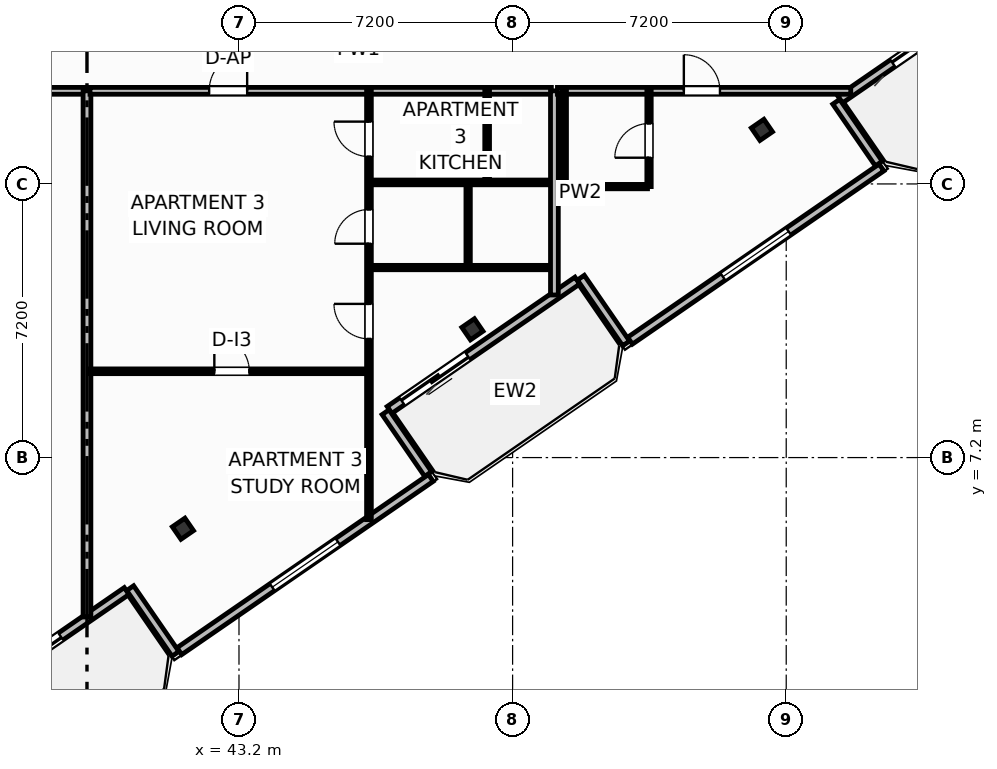
"""IFC4 building model, lengths in metres.
Left out: names, types, materials, properties, quantities, classifications, styles, units other than length and angle.
Written with IfcOpenShell. Run it as: python <this file> out.ifc"""

import sys

from ifc_helpers import new_model, si_unit, direction, frame, frame_2d, origin, origin_2d, place, context, subcontext, project, spatial, rectangle, i_section, extrude, element, fill, save


model = new_model("IFC4")
c1 = context("Model", 3, precision=1e-05, world=origin(), true_north=direction((0.0, 1.0)))
c2 = subcontext(c1, "Body", "Model", "MODEL_VIEW")
j1 = project(units=[si_unit("LENGTHUNIT", "METRE"), si_unit("PLANEANGLEUNIT", "RADIAN")], contexts=[c1])
p1 = place(None, origin())
s1 = spatial("IfcSite", under=j1, at=p1, CompositionType="ELEMENT")
p2 = place(p1, origin())
s2 = spatial("IfcBuilding", under=s1, at=p2, CompositionType="ELEMENT")
p3 = place(p2, frame((0.0, 0.0, 269.3)))
s3 = spatial("IfcBuildingStorey", under=s2, at=p3, CompositionType="ELEMENT", Elevation=269.3)
for number, where, z_axis, x_axis in (
    (1, (41.725, 5.328, 0.0), (0.0, 0.0, 1.0), (0.824, 0.567, 0.0)),
    (2, (49.343, 10.575, 0.0), (0.0, 0.0, 1.0), (0.824, 0.567, 0.0)),
    (3, (56.96, 15.823, 0.0), (0.0, 0.0, 1.0), (0.824, 0.567, 0.0)),
):
    element("IfcColumn", number, at=place(p3, frame(where, z_axis=z_axis, x_axis=x_axis)), inside=s3, PredefinedType="COLUMN", context=c2, shape_type="SweptSolid", body=[
        extrude(i_section(OverallWidth=0.401, OverallDepth=0.399, WebThickness=0.025, FlangeThickness=0.04, FilletRadius=0.022, at=origin_2d()), origin(), (0.0, 0.0, 1.0), 3.7),
    ])
p4 = place(p3, frame((40.244, 3.688, 0.0), z_axis=(0.0, 0.0, 1.0), x_axis=(-0.823541290762, -0.567256328665, 0.0)))
e4 = element("IfcWall", 4, at=p4, inside=s3, PredefinedType="SOLIDWALL", context=c2, shape_type="SweptSolid", body=[
    extrude(rectangle(XDim=5.567, YDim=0.22, at=frame_2d((2.784, 0.0))), origin(), (0.0, 0.0, 1.0), 2.73),
])
p5 = place(p4, frame((2.107, 0.0, 0.0)))
e5 = element("IfcOpeningElement", 5, at=p5, cuts=e4, PredefinedType="OPENING", context=c2, shape_type="SweptSolid", body=[
    extrude(rectangle(XDim=2.1, YDim=2.3, at=frame_2d((1.05, 1.15))), frame((0.0, 0.12, 0.0), z_axis=(0.0, -1.0, 0.0), x_axis=(1.0, 0.0, 0.0)), (0.0, 0.0, 1.0), 0.24),
])
p6 = place(p3, frame((52.103, 11.857, 0.0), z_axis=(0.0, 0.0, 1.0), x_axis=(-0.823534636215, -0.567265989598, 0.0)))
e6 = element("IfcWall", 6, at=p6, inside=s3, PredefinedType="SOLIDWALL", context=c2, shape_type="SweptSolid", body=[
    extrude(rectangle(XDim=6.0, YDim=0.22, at=frame_2d((3.0, 0.0))), origin(), (0.0, 0.0, 1.0), 2.73),
])
p7 = place(p6, frame((3.5, 0.0, 0.0)))
e7 = element("IfcOpeningElement", 7, at=p7, cuts=e6, PredefinedType="OPENING", context=c2, shape_type="SweptSolid", body=[
    extrude(rectangle(XDim=2.1, YDim=2.3, at=frame_2d((1.05, 1.15))), frame((0.0, 0.12, 0.0), z_axis=(0.0, -1.0, 0.0), x_axis=(1.0, 0.0, 0.0)), (0.0, 0.0, 1.0), 0.24),
])
p8 = place(p3, frame((63.605, 19.78, 0.0), z_axis=(0.0, 0.0, 1.0), x_axis=(-0.823541290762, -0.567256328665, 0.0)))
e8 = element("IfcWall", 8, at=p8, inside=s3, PredefinedType="SOLIDWALL", context=c2, shape_type="SweptSolid", body=[
    extrude(rectangle(XDim=5.567, YDim=0.22, at=frame_2d((2.784, 0.0))), origin(), (0.0, 0.0, 1.0), 2.73),
])
p9 = place(p8, frame((1.787, 0.0, 0.0)))
e9 = element("IfcOpeningElement", 9, at=p9, cuts=e8, PredefinedType="OPENING", context=c2, shape_type="SweptSolid", body=[
    extrude(rectangle(XDim=2.1, YDim=2.3, at=frame_2d((1.05, 1.15))), frame((0.0, 0.12, 0.0), z_axis=(0.0, -1.0, 0.0), x_axis=(1.0, 0.0, 0.0)), (0.0, 0.0, 1.0), 0.24),
])
p10 = place(p3, frame((40.337, 3.765, 0.0), z_axis=(0.0, 0.0, 1.0), x_axis=(0.567352541689, -0.823475010816, 0.0)))
e10 = element("IfcWall", 10, at=p10, inside=s3, PredefinedType="SOLIDWALL", context=c2, shape_type="SweptSolid", body=[
    extrude(rectangle(XDim=2.1, YDim=0.22, at=frame_2d((1.05, 0.0))), origin(), (0.0, 0.0, 1.0), 2.73),
])
p11 = place(p3, frame((41.631, 2.106, 0.0), z_axis=(0.0, 0.0, 1.0), x_axis=(0.823530942962, 0.56727135128, 0.0)))
e11 = element("IfcWall", 11, at=p11, inside=s3, PredefinedType="SOLIDWALL", context=c2, shape_type="SweptSolid", body=[
    extrude(rectangle(XDim=8.035, YDim=0.22, at=frame_2d((4.018, 0.0))), origin(), (0.0, 0.0, 1.0), 2.73),
])
p12 = place(p11, frame((2.968, 0.0, 0.8)))
e12 = element("IfcOpeningElement", 12, at=p12, cuts=e11, PredefinedType="OPENING", context=c2, shape_type="SweptSolid", body=[
    extrude(rectangle(XDim=2.1, YDim=1.75, at=frame_2d((1.05, 0.875))), frame((0.0, 0.12, 0.0), z_axis=(0.0, -1.0, 0.0), x_axis=(1.0, 0.0, 0.0)), (0.0, 0.0, 1.0), 0.24),
])
p13 = place(p3, frame((48.177, 6.767, 0.0), z_axis=(0.0, 0.0, 1.0), x_axis=(-0.567273565974, 0.823529417415, 0.0)))
e13 = element("IfcWall", 13, at=p13, inside=s3, PredefinedType="SOLIDWALL", context=c2, shape_type="SweptSolid", body=[
    extrude(rectangle(XDim=1.975, YDim=0.22, at=frame_2d((0.988, 0.0))), origin(), (0.0, 0.0, 1.0), 2.73),
])
p14 = place(p3, frame((52.196, 11.933, 0.0), z_axis=(0.0, 0.0, 1.0), x_axis=(0.56729822855, -0.823512428494, 0.0)))
e14 = element("IfcWall", 14, at=p14, inside=s3, PredefinedType="SOLIDWALL", context=c2, shape_type="SweptSolid", body=[
    extrude(rectangle(XDim=2.1, YDim=0.22, at=frame_2d((1.05, 0.0))), origin(), (0.0, 0.0, 1.0), 2.73),
])
p15 = place(p3, frame((53.49, 10.275, 0.0), z_axis=(0.0, 0.0, 1.0), x_axis=(0.823530942962, 0.56727135128, 0.0)))
e15 = element("IfcWall", 15, at=p15, inside=s3, PredefinedType="SOLIDWALL", context=c2, shape_type="SweptSolid", body=[
    extrude(rectangle(XDim=8.035, YDim=0.22, at=frame_2d((4.018, 0.0))), origin(), (0.0, 0.0, 1.0), 2.73),
])
p16 = place(p15, frame((2.968, 0.0, 0.8)))
e16 = element("IfcOpeningElement", 16, at=p16, cuts=e15, PredefinedType="OPENING", context=c2, shape_type="SweptSolid", body=[
    extrude(rectangle(XDim=2.1, YDim=1.75, at=frame_2d((1.05, 0.875))), frame((0.0, 0.12, 0.0), z_axis=(0.0, -1.0, 0.0), x_axis=(1.0, 0.0, 0.0)), (0.0, 0.0, 1.0), 0.24),
])
p17 = place(p3, frame((60.036, 14.936, 0.0), z_axis=(0.0, 0.0, 1.0), x_axis=(-0.567273565974, 0.823529417415, 0.0)))
e17 = element("IfcWall", 17, at=p17, inside=s3, PredefinedType="SOLIDWALL", context=c2, shape_type="SweptSolid", body=[
    extrude(rectangle(XDim=1.975, YDim=0.22, at=frame_2d((0.988, 0.0))), origin(), (0.0, 0.0, 1.0), 2.73),
])
p18 = place(p3, frame((27.08, 16.85, 0.0), z_axis=(0.0, 0.0, 1.0), x_axis=(1.0, 0.0, 0.0)))
e18 = element("IfcWall", 18, at=p18, inside=s3, PredefinedType="PARTITIONING", context=c2, shape_type="SweptSolid", body=[
    extrude(rectangle(XDim=12.04, YDim=0.18, at=frame_2d((6.02, 0.0))), origin(), (0.0, 0.0, 1.0), 3.45),
])
p19 = place(p18, frame((3.328, 0.0, 0.0)))
e19 = element("IfcOpeningElement", 19, at=p19, cuts=e18, PredefinedType="OPENING", context=c2, shape_type="SweptSolid", body=[
    extrude(rectangle(XDim=0.95, YDim=2.15, at=frame_2d((0.475, 1.075))), frame((0.0, 0.1, 0.0), z_axis=(0.0, -1.0, 0.0), x_axis=(1.0, 0.0, 0.0)), (0.0, 0.0, 1.0), 0.2),
])
p20 = place(p3, frame((39.2, 3.006, 0.0), z_axis=(0.0, 0.0, 1.0), x_axis=(0.0, 1.0, 0.0)))
e20 = element("IfcWall", 20, at=p20, inside=s3, PredefinedType="PARTITIONING", context=c2, shape_type="SweptSolid", body=[
    extrude(rectangle(XDim=13.844, YDim=0.205, at=frame_2d((6.922, 0.0))), origin(), (0.0, 0.0, 1.0), 3.45),
])
p21 = place(p3, frame((39.28, 9.47, 0.0), z_axis=(0.0, 0.0, 1.0), x_axis=(1.0, 0.0, 0.0)))
e21 = element("IfcWall", 21, at=p21, inside=s3, PredefinedType="PARTITIONING", context=c2, shape_type="SweptSolid", body=[
    extrude(rectangle(XDim=7.27, YDim=0.125, at=frame_2d((3.635, 0.0))), origin(), (0.0, 0.0, 1.0), 3.45),
])
p22 = place(p21, frame((3.271, 0.0, 0.0)))
e22 = element("IfcOpeningElement", 22, at=p22, cuts=e21, PredefinedType="OPENING", context=c2, shape_type="SweptSolid", body=[
    extrude(rectangle(XDim=0.92, YDim=2.05, at=frame_2d((0.46, 1.025))), frame((0.0, 0.073, 0.0), z_axis=(0.0, -1.0, 0.0), x_axis=(1.0, 0.0, 0.0)), (0.0, 0.0, 1.0), 0.145),
])
p23 = place(p3, frame((39.28, 16.85, 0.0), z_axis=(0.0, 0.0, 1.0), x_axis=(1.0, 0.0, 0.0)))
e23 = element("IfcWall", 23, at=p23, inside=s3, PredefinedType="PARTITIONING", context=c2, shape_type="SweptSolid", body=[
    extrude(rectangle(XDim=12.14, YDim=0.18, at=frame_2d((6.07, 0.0))), origin(), (0.0, 0.0, 1.0), 3.45),
])
p24 = place(p23, frame((3.135, 0.0, 0.0)))
e24 = element("IfcOpeningElement", 24, at=p24, cuts=e23, PredefinedType="OPENING", context=c2, shape_type="SweptSolid", body=[
    extrude(rectangle(XDim=1.0, YDim=2.2, at=frame_2d((0.5, 1.1))), frame((0.0, 0.1, 0.0), z_axis=(0.0, -1.0, 0.0), x_axis=(1.0, 0.0, 0.0)), (0.0, 0.0, 1.0), 0.2),
])
p25 = place(p3, frame((46.62, 5.567, 0.0), z_axis=(0.0, 0.0, 1.0), x_axis=(0.0, 1.0, 0.0)))
e25 = element("IfcWall", 25, at=p25, inside=s3, PredefinedType="PARTITIONING", context=c2, shape_type="SweptSolid", body=[
    extrude(rectangle(XDim=11.283, YDim=0.125, at=frame_2d((5.642, 0.0))), origin(), (0.0, 0.0, 1.0), 3.45),
])
p26 = place(p25, frame((4.757, 0.0, 0.0)))
e26 = element("IfcOpeningElement", 26, at=p26, cuts=e25, PredefinedType="OPENING", context=c2, shape_type="SweptSolid", body=[
    extrude(rectangle(XDim=0.92, YDim=2.05, at=frame_2d((0.46, 1.025))), frame((0.0, 0.073, 0.0), z_axis=(0.0, -1.0, 0.0), x_axis=(1.0, 0.0, 0.0)), (0.0, 0.0, 1.0), 0.145),
])
p27 = place(p25, frame((7.26, 0.0, 0.0)))
e27 = element("IfcOpeningElement", 27, at=p27, cuts=e25, PredefinedType="OPENING", context=c2, shape_type="SweptSolid", body=[
    extrude(rectangle(XDim=0.9, YDim=2.05, at=frame_2d((0.45, 1.025))), frame((0.0, 0.073, 0.0), z_axis=(0.0, -1.0, 0.0), x_axis=(1.0, 0.0, 0.0)), (0.0, 0.0, 1.0), 0.145),
])
p28 = place(p25, frame((9.553, 0.0, 0.0)))
e28 = element("IfcOpeningElement", 28, at=p28, cuts=e25, PredefinedType="OPENING", context=c2, shape_type="SweptSolid", body=[
    extrude(rectangle(XDim=0.92, YDim=2.05, at=frame_2d((0.46, 1.025))), frame((0.0, 0.073, 0.0), z_axis=(0.0, -1.0, 0.0), x_axis=(1.0, 0.0, 0.0)), (0.0, 0.0, 1.0), 0.145),
])
p29 = place(p3, frame((46.69, 14.44, 0.0), z_axis=(0.0, 0.0, 1.0), x_axis=(1.0, 0.0, 0.0)))
e29 = element("IfcWall", 29, at=p29, inside=s3, PredefinedType="PARTITIONING", context=c2, shape_type="SweptSolid", body=[
    extrude(rectangle(XDim=4.73, YDim=0.125, at=frame_2d((2.365, 0.0))), origin(), (0.0, 0.0, 1.0), 3.45),
])
p30 = place(p3, frame((46.69, 12.2, 0.0), z_axis=(0.0, 0.0, 1.0), x_axis=(1.0, 0.0, 0.0)))
e30 = element("IfcWall", 30, at=p30, inside=s3, PredefinedType="PARTITIONING", context=c2, shape_type="SweptSolid", body=[
    extrude(rectangle(XDim=4.73, YDim=0.115, at=frame_2d((2.365, 0.0))), origin(), (0.0, 0.0, 1.0), 3.45),
])
p31 = place(p3, frame((49.73, 14.44, 0.0), z_axis=(0.0, 0.0, 1.0), x_axis=(0.0, 1.0, 0.0)))
e31 = element("IfcWall", 31, at=p31, inside=s3, PredefinedType="PARTITIONING", context=c2, shape_type="SweptSolid", body=[
    extrude(rectangle(XDim=2.41, YDim=0.125, at=frame_2d((1.205, 0.0))), origin(), (0.0, 0.0, 1.0), 3.45),
])
p32 = place(p3, frame((49.23, 12.2, 0.0), z_axis=(0.0, 0.0, 1.0), x_axis=(0.0, 1.0, 0.0)))
e32 = element("IfcWall", 32, at=p32, inside=s3, PredefinedType="PARTITIONING", context=c2, shape_type="SweptSolid", body=[
    extrude(rectangle(XDim=2.24, YDim=0.115, at=frame_2d((1.12, 0.0))), origin(), (0.0, 0.0, 1.0), 3.45),
])
p33 = place(p3, frame((51.5, 11.479, 0.0), z_axis=(0.0, 0.0, 1.0), x_axis=(0.0, 1.0, 0.0)))
e33 = element("IfcWall", 33, at=p33, inside=s3, PredefinedType="PARTITIONING", context=c2, shape_type="SweptSolid", body=[
    extrude(rectangle(XDim=5.372, YDim=0.205, at=frame_2d((2.686, 0.0))), origin(), (0.0, 0.0, 1.0), 3.45),
])
p34 = place(p3, frame((51.58, 16.85, 0.0), z_axis=(0.0, 0.0, 1.0), x_axis=(1.0, 0.0, 0.0)))
e34 = element("IfcWall", 34, at=p34, inside=s3, PredefinedType="PARTITIONING", context=c2, shape_type="SweptSolid", body=[
    extrude(rectangle(XDim=7.718, YDim=0.18, at=frame_2d((3.859, 0.0))), origin(), (0.0, 0.0, 1.0), 3.45),
])
p35 = place(p34, frame((3.326, 0.0, 0.0)))
e35 = element("IfcOpeningElement", 35, at=p35, cuts=e34, PredefinedType="OPENING", context=c2, shape_type="SweptSolid", body=[
    extrude(rectangle(XDim=0.95, YDim=2.15, at=frame_2d((0.475, 1.075))), frame((0.0, 0.1, 0.0), z_axis=(0.0, -1.0, 0.0), x_axis=(1.0, 0.0, 0.0)), (0.0, 0.0, 1.0), 0.2),
])
p36 = place(p3, frame((51.8, 14.33, 0.0), z_axis=(0.0, 0.0, 1.0), x_axis=(1.0, 0.0, 0.0)))
e36 = element("IfcWall", 36, at=p36, inside=s3, PredefinedType="PARTITIONING", context=c2, shape_type="SweptSolid", body=[
    extrude(rectangle(XDim=2.15, YDim=0.115, at=frame_2d((1.075, 0.0))), origin(), (0.0, 0.0, 1.0), 3.45),
])
p37 = place(p3, frame((53.99, 14.33, 0.0), z_axis=(0.0, 0.0, 1.0), x_axis=(0.0, 1.0, 0.0)))
e37 = element("IfcWall", 37, at=p37, inside=s3, PredefinedType="PARTITIONING", context=c2, shape_type="SweptSolid", body=[
    extrude(rectangle(XDim=2.52, YDim=0.115, at=frame_2d((1.26, 0.0))), origin(), (0.0, 0.0, 1.0), 3.45),
])
p38 = place(p37, frame((0.76, 0.0, 0.0)))
e38 = element("IfcOpeningElement", 38, at=p38, cuts=e37, PredefinedType="OPENING", context=c2, shape_type="SweptSolid", body=[
    extrude(rectangle(XDim=0.9, YDim=2.05, at=frame_2d((0.45, 1.025))), frame((0.0, 0.067, 0.0), z_axis=(0.0, -1.0, 0.0), x_axis=(1.0, 0.0, 0.0)), (0.0, 0.0, 1.0), 0.135),
])
p39 = place(p3, frame((51.76, 14.33, 0.0), z_axis=(0.0, 0.0, 1.0), x_axis=(0.0, 1.0, 0.0)))
e39 = element("IfcWall", 39, at=p39, inside=s3, PredefinedType="PARTITIONING", context=c2, shape_type="SweptSolid", body=[
    extrude(rectangle(XDim=2.52, YDim=0.115, at=frame_2d((1.26, 0.0))), origin(), (0.0, 0.0, 1.0), 3.45),
])
p40 = place(p5, origin())
e40 = element("IfcDoor", 40, at=p40, inside=s3, OperationType="SLIDING_TO_LEFT", PredefinedType="DOOR", context=c2, shape_type="SweptSolid", body=[
    extrude(rectangle(XDim=2.1, YDim=2.3, at=frame_2d((1.05, 1.15))), frame((0.0, 0.025, 0.0), z_axis=(0.0, -1.0, 0.0), x_axis=(1.0, 0.0, 0.0)), (0.0, 0.0, 1.0), 0.05),
])
fill(e5, e40)
p41 = place(p7, origin())
e41 = element("IfcDoor", 41, at=p41, inside=s3, OperationType="SLIDING_TO_LEFT", PredefinedType="DOOR", context=c2, shape_type="SweptSolid", body=[
    extrude(rectangle(XDim=2.1, YDim=2.3, at=frame_2d((1.05, 1.15))), frame((0.0, 0.025, 0.0), z_axis=(0.0, -1.0, 0.0), x_axis=(1.0, 0.0, 0.0)), (0.0, 0.0, 1.0), 0.05),
])
fill(e7, e41)
p42 = place(p9, origin())
e42 = element("IfcDoor", 42, at=p42, inside=s3, OperationType="SLIDING_TO_LEFT", PredefinedType="DOOR", context=c2, shape_type="SweptSolid", body=[
    extrude(rectangle(XDim=2.1, YDim=2.3, at=frame_2d((1.05, 1.15))), frame((0.0, 0.025, 0.0), z_axis=(0.0, -1.0, 0.0), x_axis=(1.0, 0.0, 0.0)), (0.0, 0.0, 1.0), 0.05),
])
fill(e9, e42)
p43 = place(p12, origin())
e43 = element("IfcWindow", 43, at=p43, inside=s3, PartitioningType="SINGLE_PANEL", PredefinedType="WINDOW", context=c2, shape_type="SweptSolid", body=[
    extrude(rectangle(XDim=2.1, YDim=1.75, at=frame_2d((1.05, 0.875))), frame((0.0, 0.03, 0.0), z_axis=(0.0, -1.0, 0.0), x_axis=(1.0, 0.0, 0.0)), (0.0, 0.0, 1.0), 0.06),
])
fill(e12, e43)
p44 = place(p16, origin())
e44 = element("IfcWindow", 44, at=p44, inside=s3, PartitioningType="SINGLE_PANEL", PredefinedType="WINDOW", context=c2, shape_type="SweptSolid", body=[
    extrude(rectangle(XDim=2.1, YDim=1.75, at=frame_2d((1.05, 0.875))), frame((0.0, 0.03, 0.0), z_axis=(0.0, -1.0, 0.0), x_axis=(1.0, 0.0, 0.0)), (0.0, 0.0, 1.0), 0.06),
])
fill(e16, e44)
p45 = place(p22, origin())
e45 = element("IfcDoor", 45, at=p45, inside=s3, OperationType="SINGLE_SWING_LEFT", PredefinedType="DOOR", context=c2, shape_type="SweptSolid", body=[
    extrude(rectangle(XDim=0.92, YDim=2.05, at=frame_2d((0.46, 1.025))), frame((0.0, 0.025, 0.0), z_axis=(0.0, -1.0, 0.0), x_axis=(1.0, 0.0, 0.0)), (0.0, 0.0, 1.0), 0.05),
])
fill(e22, e45)
p46 = place(p24, origin())
e46 = element("IfcDoor", 46, at=p46, inside=s3, OperationType="SINGLE_SWING_RIGHT", PredefinedType="DOOR", context=c2, shape_type="SweptSolid", body=[
    extrude(rectangle(XDim=1.0, YDim=2.2, at=frame_2d((0.5, 1.1))), frame((0.0, 0.025, 0.0), z_axis=(0.0, -1.0, 0.0), x_axis=(1.0, 0.0, 0.0)), (0.0, 0.0, 1.0), 0.05),
])
fill(e24, e46)
p47 = place(p26, origin())
e47 = element("IfcDoor", 47, at=p47, inside=s3, OperationType="SINGLE_SWING_RIGHT", PredefinedType="DOOR", context=c2, shape_type="SweptSolid", body=[
    extrude(rectangle(XDim=0.92, YDim=2.05, at=frame_2d((0.46, 1.025))), frame((0.0, 0.025, 0.0), z_axis=(0.0, -1.0, 0.0), x_axis=(1.0, 0.0, 0.0)), (0.0, 0.0, 1.0), 0.05),
])
fill(e26, e47)
p48 = place(p27, origin())
e48 = element("IfcDoor", 48, at=p48, inside=s3, OperationType="SINGLE_SWING_LEFT", PredefinedType="DOOR", context=c2, shape_type="SweptSolid", body=[
    extrude(rectangle(XDim=0.9, YDim=2.05, at=frame_2d((0.45, 1.025))), frame((0.0, 0.025, 0.0), z_axis=(0.0, -1.0, 0.0), x_axis=(1.0, 0.0, 0.0)), (0.0, 0.0, 1.0), 0.05),
])
fill(e27, e48)
p49 = place(p28, origin())
e49 = element("IfcDoor", 49, at=p49, inside=s3, OperationType="SINGLE_SWING_RIGHT", PredefinedType="DOOR", context=c2, shape_type="SweptSolid", body=[
    extrude(rectangle(XDim=0.92, YDim=2.05, at=frame_2d((0.46, 1.025))), frame((0.0, 0.025, 0.0), z_axis=(0.0, -1.0, 0.0), x_axis=(1.0, 0.0, 0.0)), (0.0, 0.0, 1.0), 0.05),
])
fill(e28, e49)
p50 = place(p35, origin())
e50 = element("IfcDoor", 50, at=p50, inside=s3, OperationType="SINGLE_SWING_LEFT", PredefinedType="DOOR", context=c2, shape_type="SweptSolid", body=[
    extrude(rectangle(XDim=0.95, YDim=2.15, at=frame_2d((0.475, 1.075))), frame((0.0, 0.025, 0.0), z_axis=(0.0, -1.0, 0.0), x_axis=(1.0, 0.0, 0.0)), (0.0, 0.0, 1.0), 0.05),
])
fill(e35, e50)
p51 = place(p38, origin())
e51 = element("IfcDoor", 51, at=p51, inside=s3, OperationType="SINGLE_SWING_LEFT", PredefinedType="DOOR", context=c2, shape_type="SweptSolid", body=[
    extrude(rectangle(XDim=0.9, YDim=2.05, at=frame_2d((0.45, 1.025))), frame((0.0, 0.025, 0.0), z_axis=(0.0, -1.0, 0.0), x_axis=(1.0, 0.0, 0.0)), (0.0, 0.0, 1.0), 0.05),
])
fill(e38, e51)
save(model, sys.argv[1])
